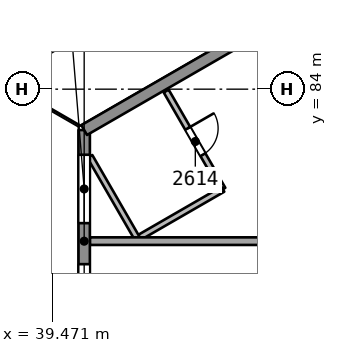
"""IFC4 building model, lengths in metres.
Left out: names, types, materials, properties, quantities, classifications, styles, units other than length and angle.
Written with IfcOpenShell. Run it as: python <this file> out.ifc"""

import sys

from ifc_helpers import new_model, si_unit, direction, frame, frame_2d, origin, place, context, subcontext, project, spatial, rectangle, extrude, element, fill, save


model = new_model("IFC4")
c1 = context("Model", 3, precision=1e-05, world=origin(), true_north=direction((0.0, 1.0)))
c2 = subcontext(c1, "Body", "Model", "MODEL_VIEW")
j1 = project(units=[si_unit("LENGTHUNIT", "METRE"), si_unit("PLANEANGLEUNIT", "RADIAN")], contexts=[c1])
p1 = place(None, origin())
s1 = spatial("IfcSite", under=j1, at=p1, CompositionType="ELEMENT")
p2 = place(p1, origin())
s2 = spatial("IfcBuilding", under=s1, at=p2, CompositionType="ELEMENT")
p3 = place(p2, frame((0.0, 0.0, 110.5)))
s3 = spatial("IfcBuildingStorey", under=s2, at=p3, CompositionType="ELEMENT", Elevation=110.5)
p4 = place(p3, frame((42.473, 83.95, 0.0), z_axis=(0.0, 0.0, 1.0), x_axis=(0.500029427677, -0.866008413041, 0.0)))
e1 = element("IfcWall", 1, at=p4, inside=s3, PredefinedType="PARTITIONING", context=c2, shape_type="SweptSolid", body=[
    extrude(rectangle(XDim=2.983, YDim=0.15, at=frame_2d((1.492, 0.0))), origin(), (0.0, 0.0, 1.0), 3.25),
])
p5 = place(p4, frame((1.133, 0.0, 0.0)))
e2 = element("IfcOpeningElement", 2, at=p5, cuts=e1, PredefinedType="OPENING", context=c2, shape_type="SweptSolid", body=[
    extrude(rectangle(XDim=0.8, YDim=2.1, at=frame_2d((0.4, 1.05))), frame((0.0, 0.085, 0.0), z_axis=(0.0, -1.0, 0.0), x_axis=(1.0, 0.0, 0.0)), (0.0, 0.0, 1.0), 0.171),
])
p6 = place(p3, frame((43.964, 81.367, 0.0), z_axis=(0.0, 0.0, 1.0), x_axis=(-0.866021400173, -0.500006934395, 0.0)))
e3 = element("IfcWall", 3, at=p6, inside=s3, PredefinedType="PARTITIONING", context=c2, shape_type="SweptSolid", body=[
    extrude(rectangle(XDim=2.6, YDim=0.15, at=frame_2d((1.3, 0.0))), origin(), (0.0, 0.0, 1.0), 3.25),
])
p7 = place(p3, frame((41.713, 80.067, 0.0), z_axis=(0.0, 0.0, 1.0), x_axis=(-0.500018619731, 0.866014653411, 0.0)))
e4 = element("IfcWall", 4, at=p7, inside=s3, PredefinedType="PARTITIONING", context=c2, shape_type="SweptSolid", body=[
    extrude(rectangle(XDim=2.498, YDim=0.15, at=frame_2d((1.249, 0.0))), origin(), (0.0, 0.0, 1.0), 3.25),
])
p8 = place(p3, frame((40.464, 80.001, 0.0), z_axis=(0.0, 0.0, 1.0), x_axis=(1.0, 0.0, 0.0)))
e5 = element("IfcWall", 5, at=p8, inside=s3, PredefinedType="PARTITIONING", context=c2, shape_type="SweptSolid", body=[
    extrude(rectangle(XDim=7.734, YDim=0.2, at=frame_2d((3.867, 0.0))), origin(), (0.0, 0.0, 1.0), 3.25),
])
p9 = place(p3, frame((40.315, 77.076, 0.0), z_axis=(0.0, 0.0, 1.0), x_axis=(0.0, 1.0, 0.0)))
e6 = element("IfcWall", 6, at=p9, inside=s3, PredefinedType="SOLIDWALL", context=c2, shape_type="SweptSolid", body=[
    extrude(rectangle(XDim=5.848, YDim=0.3, at=frame_2d((2.924, 0.0))), origin(), (0.0, 0.0, 1.0), 3.25),
])
p10 = place(p9, frame((3.398, 0.0, 0.9)))
e7 = element("IfcOpeningElement", 7, at=p10, cuts=e6, PredefinedType="OPENING", context=c2, shape_type="SweptSolid", body=[
    extrude(rectangle(XDim=1.8, YDim=1.5, at=frame_2d((0.9, 0.75))), frame((0.0, 0.161, 0.0), z_axis=(0.0, -1.0, 0.0), x_axis=(1.0, 0.0, 0.0)), (0.0, 0.0, 1.0), 0.321),
])
p11 = place(p9, frame((0.519, 0.0, 0.9)))
e8 = element("IfcOpeningElement", 8, at=p11, cuts=e6, PredefinedType="OPENING", context=c2, shape_type="SweptSolid", body=[
    extrude(rectangle(XDim=1.8, YDim=1.5, at=frame_2d((0.9, 0.75))), frame((0.0, 0.161, 0.0), z_axis=(0.0, -1.0, 0.0), x_axis=(1.0, 0.0, 0.0)), (0.0, 0.0, 1.0), 0.321),
])
p12 = place(p3, frame((40.315, 82.924, 0.0), z_axis=(0.0, 0.0, 1.0), x_axis=(0.866025315226, 0.500000153387, 0.0)))
e9 = element("IfcWall", 9, at=p12, inside=s3, PredefinedType="SOLIDWALL", context=c2, shape_type="SweptSolid", body=[
    extrude(rectangle(XDim=57.152, YDim=0.3, at=frame_2d((28.576, 0.0))), origin(), (0.0, 0.0, 1.0), 3.25),
])
p13 = place(p12, frame((23.479, 0.0, 0.0)))
e10 = element("IfcOpeningElement", 10, at=p13, cuts=e9, PredefinedType="OPENING", context=c2, shape_type="SweptSolid", body=[
    extrude(rectangle(XDim=2.4, YDim=2.4, at=frame_2d((1.2, 1.2))), frame((0.0, 0.161, 0.0), z_axis=(0.0, -1.0, 0.0), x_axis=(1.0, 0.0, 0.0)), (0.0, 0.0, 1.0), 0.321),
])
p14 = place(p12, frame((10.373, 0.0, 0.0)))
e11 = element("IfcOpeningElement", 11, at=p14, cuts=e9, PredefinedType="OPENING", context=c2, shape_type="SweptSolid", body=[
    extrude(rectangle(XDim=2.4, YDim=2.4, at=frame_2d((1.2, 1.2))), frame((0.0, 0.161, 0.0), z_axis=(0.0, -1.0, 0.0), x_axis=(1.0, 0.0, 0.0)), (0.0, 0.0, 1.0), 0.321),
])
p15 = place(p12, frame((41.708, 0.0, 0.0)))
e12 = element("IfcOpeningElement", 12, at=p15, cuts=e9, PredefinedType="OPENING", context=c2, shape_type="SweptSolid", body=[
    extrude(rectangle(XDim=2.4, YDim=2.4, at=frame_2d((1.2, 1.2))), frame((0.0, 0.161, 0.0), z_axis=(0.0, -1.0, 0.0), x_axis=(1.0, 0.0, 0.0)), (0.0, 0.0, 1.0), 0.321),
])
p16 = place(p5, origin())
e13 = element("IfcDoor", 13, at=p16, inside=s3, OperationType="SINGLE_SWING_LEFT", PredefinedType="NOTDEFINED", context=c2, shape_type="SweptSolid", body=[
    extrude(rectangle(XDim=0.8, YDim=2.1, at=frame_2d((0.4, 1.05))), frame((0.0, 0.025, 0.0), z_axis=(0.0, -1.0, 0.0), x_axis=(1.0, 0.0, 0.0)), (0.0, 0.0, 1.0), 0.05),
])
fill(e2, e13)
p17 = place(p10, origin())
e14 = element("IfcWindow", 14, at=p17, inside=s3, PartitioningType="SINGLE_PANEL", PredefinedType="WINDOW", context=c2, shape_type="SweptSolid", body=[
    extrude(rectangle(XDim=1.8, YDim=1.5, at=frame_2d((0.9, 0.75))), frame((0.0, 0.03, 0.0), z_axis=(0.0, -1.0, 0.0), x_axis=(1.0, 0.0, 0.0)), (0.0, 0.0, 1.0), 0.06),
])
fill(e7, e14)
p18 = place(p11, origin())
e15 = element("IfcWindow", 15, at=p18, inside=s3, PartitioningType="SINGLE_PANEL", PredefinedType="WINDOW", context=c2, shape_type="SweptSolid", body=[
    extrude(rectangle(XDim=1.8, YDim=1.5, at=frame_2d((0.9, 0.75))), frame((0.0, 0.03, 0.0), z_axis=(0.0, -1.0, 0.0), x_axis=(1.0, 0.0, 0.0)), (0.0, 0.0, 1.0), 0.06),
])
fill(e8, e15)
save(model, sys.argv[1])
